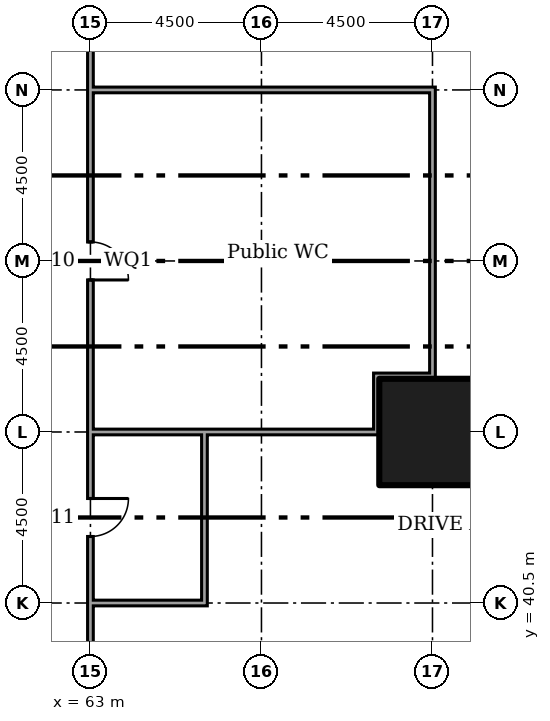
"""IFC4 building model, lengths in metres.
Left out: names, types, materials, properties, quantities, classifications, styles, units other than length and angle.
Written with IfcOpenShell. Run it as: python <this file> out.ifc"""

import sys

from ifc_helpers import new_model, si_unit, direction, frame, frame_2d, origin, origin_2d, place, context, subcontext, project, spatial, rectangle, extrude, element, fill, save


model = new_model("IFC4")
c1 = context("Model", 3, precision=1e-05, world=origin(), true_north=direction((0.0, 1.0)))
c2 = subcontext(c1, "Body", "Model", "MODEL_VIEW")
j1 = project(units=[si_unit("LENGTHUNIT", "METRE"), si_unit("PLANEANGLEUNIT", "RADIAN")], contexts=[c1])
p1 = place(None, origin())
s1 = spatial("IfcSite", under=j1, at=p1, CompositionType="ELEMENT")
p2 = place(p1, origin())
s2 = spatial("IfcBuilding", under=s1, at=p2, CompositionType="ELEMENT")
p3 = place(p2, frame((0.0, 0.0, -8.0)))
s3 = spatial("IfcBuildingStorey", under=s2, at=p3, CompositionType="ELEMENT", Elevation=-8.0)
p4 = place(p3, frame((72.0, 45.0, 0.0)))
e1 = element("IfcColumn", 1, at=p4, inside=s3, PredefinedType="COLUMN", context=c2, shape_type="SweptSolid", body=[
    extrude(rectangle(XDim=2.8, YDim=2.8, at=origin_2d()), origin(), (0.0, 0.0, 1.0), 4.0),
])
p5 = place(p3, frame((63.0, 44.925, 0.0), z_axis=(0.0, 0.0, 1.0), x_axis=(0.0, 1.0, 0.0)))
e2 = element("IfcWall", 2, at=p5, inside=s3, PredefinedType="PARTITIONING", context=c2, shape_type="SweptSolid", body=[
    extrude(rectangle(XDim=9.15, YDim=0.15, at=frame_2d((4.575, 0.0))), origin(), (0.0, 0.0, 1.0), 3.55),
])
p6 = place(p5, frame((4.075, 0.0, 0.0)))
e3 = element("IfcOpeningElement", 3, at=p6, cuts=e2, PredefinedType="OPENING", context=c2, shape_type="SweptSolid", body=[
    extrude(rectangle(XDim=1.0, YDim=2.1, at=frame_2d((0.5, 1.05))), frame((0.0, 0.085, 0.0), z_axis=(0.0, -1.0, 0.0), x_axis=(1.0, 0.0, 0.0)), (0.0, 0.0, 1.0), 0.17),
])
p7 = place(p3, frame((63.0, 40.425, 0.0), z_axis=(0.0, 0.0, 1.0), x_axis=(0.0, 1.0, 0.0)))
e4 = element("IfcWall", 4, at=p7, inside=s3, PredefinedType="PARTITIONING", context=c2, shape_type="SweptSolid", body=[
    extrude(rectangle(XDim=4.575, YDim=0.15, at=frame_2d((2.288, 0.0))), origin(), (0.0, 0.0, 1.0), 3.55),
])
p8 = place(p7, frame((1.825, 0.0, 0.0)))
e5 = element("IfcOpeningElement", 5, at=p8, cuts=e4, PredefinedType="OPENING", context=c2, shape_type="SweptSolid", body=[
    extrude(rectangle(XDim=1.0, YDim=2.1, at=frame_2d((0.5, 1.05))), frame((0.0, 0.085, 0.0), z_axis=(0.0, -1.0, 0.0), x_axis=(1.0, 0.0, 0.0)), (0.0, 0.0, 1.0), 0.17),
])
p9 = place(p3, frame((63.0, 35.925, 0.0), z_axis=(0.0, 0.0, 1.0), x_axis=(0.0, 1.0, 0.0)))
e6 = element("IfcWall", 6, at=p9, inside=s3, PredefinedType="PARTITIONING", context=c2, shape_type="SweptSolid", body=[
    extrude(rectangle(XDim=4.575, YDim=0.15, at=frame_2d((2.288, 0.0))), origin(), (0.0, 0.0, 1.0), 3.55),
])
p10 = place(p3, frame((63.0, 54.0, 0.0), z_axis=(0.0, 0.0, 1.0), x_axis=(0.0, 1.0, 0.0)))
e7 = element("IfcWall", 7, at=p10, inside=s3, PredefinedType="PARTITIONING", context=c2, shape_type="SweptSolid", body=[
    extrude(rectangle(XDim=3.98, YDim=0.15, at=frame_2d((1.99, 0.0))), origin(), (0.0, 0.0, 1.0), 3.55),
])
p11 = place(p3, frame((63.075, 45.0, 0.0)))
e8 = element("IfcWall", 8, at=p11, inside=s3, PredefinedType="PARTITIONING", context=c2, shape_type="SweptSolid", body=[
    extrude(rectangle(XDim=3.0, YDim=0.15, at=frame_2d((1.5, 0.0))), origin(), (0.0, 0.0, 1.0), 3.55),
])
p12 = place(p3, frame((70.525, 44.925, 0.0), z_axis=(0.0, 0.0, 1.0), x_axis=(0.0, 1.0, 0.0)))
e9 = element("IfcWall", 9, at=p12, inside=s3, PredefinedType="PARTITIONING", context=c2, shape_type="SweptSolid", body=[
    extrude(rectangle(XDim=1.625, YDim=0.15, at=frame_2d((0.812, 0.0))), origin(), (0.0, 0.0, 1.0), 3.55),
])
p13 = place(p3, frame((72.0, 46.4, 0.0), z_axis=(0.0, 0.0, 1.0), x_axis=(0.0, 1.0, 0.0)))
e10 = element("IfcWall", 10, at=p13, inside=s3, PredefinedType="PARTITIONING", context=c2, shape_type="SweptSolid", body=[
    extrude(rectangle(XDim=7.675, YDim=0.15, at=frame_2d((3.837, 0.0))), origin(), (0.0, 0.0, 1.0), 3.55),
])
p14 = place(p3, frame((66.0, 45.0, 0.0)))
e11 = element("IfcWall", 11, at=p14, inside=s3, PredefinedType="PARTITIONING", context=c2, shape_type="SweptSolid", body=[
    extrude(rectangle(XDim=4.45, YDim=0.15, at=frame_2d((2.225, 0.0))), origin(), (0.0, 0.0, 1.0), 3.55),
])
p15 = place(p3, frame((70.6, 46.475, 0.0)))
e12 = element("IfcWall", 12, at=p15, inside=s3, PredefinedType="PARTITIONING", context=c2, shape_type="SweptSolid", body=[
    extrude(rectangle(XDim=1.325, YDim=0.15, at=frame_2d((0.663, 0.0))), origin(), (0.0, 0.0, 1.0), 3.55),
])
p16 = place(p3, frame((63.075, 54.0, 0.0)))
e13 = element("IfcWall", 13, at=p16, inside=s3, PredefinedType="PARTITIONING", context=c2, shape_type="SweptSolid", body=[
    extrude(rectangle(XDim=8.85, YDim=0.15, at=frame_2d((4.425, 0.0))), origin(), (0.0, 0.0, 1.0), 3.55),
])
p17 = place(p3, frame((66.0, 40.425, 0.0), z_axis=(0.0, 0.0, 1.0), x_axis=(0.0, 1.0, 0.0)))
e14 = element("IfcWall", 14, at=p17, inside=s3, PredefinedType="PARTITIONING", context=c2, shape_type="SweptSolid", body=[
    extrude(rectangle(XDim=4.5, YDim=0.15, at=frame_2d((2.25, 0.0))), origin(), (0.0, 0.0, 1.0), 3.55),
])
p18 = place(p3, frame((63.075, 40.5, 0.0)))
e15 = element("IfcWall", 15, at=p18, inside=s3, PredefinedType="PARTITIONING", context=c2, shape_type="SweptSolid", body=[
    extrude(rectangle(XDim=2.85, YDim=0.15, at=frame_2d((1.425, 0.0))), origin(), (0.0, 0.0, 1.0), 3.55),
])
p19 = place(p6, frame((1.0, 0.0, 0.0), x_axis=(-1.0, 0.0, 0.0)))
e16 = element("IfcDoor", 16, at=p19, inside=s3, OperationType="SINGLE_SWING_LEFT", PredefinedType="DOOR", context=c2, shape_type="SweptSolid", body=[
    extrude(rectangle(XDim=1.0, YDim=2.1, at=frame_2d((0.5, 1.05))), frame((0.0, 0.025, 0.0), z_axis=(0.0, -1.0, 0.0), x_axis=(1.0, 0.0, 0.0)), (0.0, 0.0, 1.0), 0.05),
])
fill(e3, e16)
p20 = place(p8, frame((1.0, 0.0, 0.0), x_axis=(-1.0, 0.0, 0.0)))
e17 = element("IfcDoor", 17, at=p20, inside=s3, OperationType="SINGLE_SWING_RIGHT", PredefinedType="DOOR", context=c2, shape_type="SweptSolid", body=[
    extrude(rectangle(XDim=1.0, YDim=2.1, at=frame_2d((0.5, 1.05))), frame((0.0, 0.025, 0.0), z_axis=(0.0, -1.0, 0.0), x_axis=(1.0, 0.0, 0.0)), (0.0, 0.0, 1.0), 0.05),
])
fill(e5, e17)
save(model, sys.argv[1])
